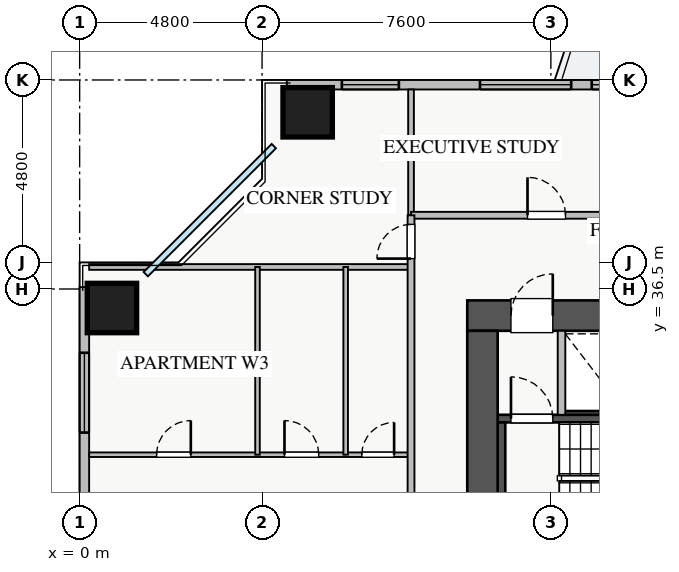
"""IFC4 building model, lengths in metres.
Left out: names, types, materials, properties, quantities, classifications, styles, units other than length and angle.
Written with IfcOpenShell. Run it as: python <this file> out.ifc"""

import sys

from ifc_helpers import new_model, si_unit, direction, frame, frame_2d, origin, origin_2d, place, context, subcontext, project, spatial, rectangle, extrude, source, transform, mapped, element, fill, save


model = new_model("IFC4")
c1 = context("Model", 3, precision=1e-05, world=origin(), true_north=direction((0.0, 1.0)))
c2 = subcontext(c1, "Body", "Model", "MODEL_VIEW")
j1 = project(units=[si_unit("LENGTHUNIT", "METRE"), si_unit("PLANEANGLEUNIT", "RADIAN")], contexts=[c1])
p1 = place(None, origin())
s1 = spatial("IfcSite", under=j1, at=p1, CompositionType="ELEMENT")
p2 = place(p1, origin())
s2 = spatial("IfcBuilding", under=s1, at=p2, CompositionType="ELEMENT")
p3 = place(p2, frame((0.0, 0.0, 89.25)))
s3 = spatial("IfcBuildingStorey", under=s2, at=p3, CompositionType="ELEMENT", Elevation=89.25)
p4 = place(p3, frame((12.68, 33.2, 0.0), z_axis=(0.0, 0.0, 1.0), x_axis=(1.0, 0.0, 0.0)))
e1 = element("IfcWall", 1, at=p4, inside=s3, PredefinedType="SHEAR", context=c2, shape_type="SweptSolid", body=[
    extrude(rectangle(XDim=1.94, YDim=0.18, at=frame_2d((0.97, 0.0))), origin(), (0.0, 0.0, 1.0), 3.03),
])
p5 = place(p3, frame((11.0, 33.09, 0.0), z_axis=(0.0, 0.0, 1.0), x_axis=(1.0, 0.0, 0.0)))
e2 = element("IfcWall", 2, at=p5, inside=s3, PredefinedType="SHEAR", context=c2, shape_type="SweptSolid", body=[
    extrude(rectangle(XDim=7.15, YDim=0.2, at=frame_2d((3.575, 0.0))), origin(), (0.0, 0.0, 1.0), 3.25),
])
p6 = place(p5, frame((0.35, 0.0, 0.0)))
e3 = element("IfcOpeningElement", 3, at=p6, cuts=e2, PredefinedType="OPENING", context=c2, shape_type="SweptSolid", body=[
    extrude(rectangle(XDim=1.1, YDim=2.05, at=frame_2d((0.55, 1.025))), frame((0.0, 0.11, 0.0), z_axis=(0.0, -1.0, 0.0), x_axis=(1.0, 0.0, 0.0)), (0.0, 0.0, 1.0), 0.22),
])
p7 = place(p3, frame((11.1, 30.05, 0.0), z_axis=(0.0, 0.0, 1.0), x_axis=(0.0, 1.0, 0.0)))
e4 = element("IfcWall", 4, at=p7, inside=s3, PredefinedType="SHEAR", context=c2, shape_type="SweptSolid", body=[
    extrude(rectangle(XDim=2.94, YDim=0.2, at=frame_2d((1.47, 0.0))), origin(), (0.0, 0.0, 1.0), 3.25),
])
p8 = place(p3, frame((10.2, 35.8, 0.0), z_axis=(0.0, 0.0, 1.0), x_axis=(1.0, 0.0, 0.0)))
e5 = element("IfcWall", 5, at=p8, inside=s3, PredefinedType="SHEAR", context=c2, shape_type="SweptSolid", body=[
    extrude(rectangle(XDim=17.6, YDim=0.8, at=frame_2d((8.8, 0.0))), origin(), (0.0, 0.0, 1.0), 3.25),
])
p9 = place(p8, frame((1.15, 0.0, 0.0)))
e6 = element("IfcOpeningElement", 6, at=p9, cuts=e5, PredefinedType="OPENING", context=c2, shape_type="SweptSolid", body=[
    extrude(rectangle(XDim=1.1, YDim=2.05, at=frame_2d((0.55, 1.025))), frame((0.0, 0.41, 0.0), z_axis=(0.0, -1.0, 0.0), x_axis=(1.0, 0.0, 0.0)), (0.0, 0.0, 1.0), 0.82),
])
p10 = place(p8, frame((8.3, 0.0, 0.0)))
e7 = element("IfcOpeningElement", 7, at=p10, cuts=e5, PredefinedType="OPENING", context=c2, shape_type="SweptSolid", body=[
    extrude(rectangle(XDim=1.1, YDim=2.05, at=frame_2d((0.55, 1.025))), frame((0.0, 0.41, 0.0), z_axis=(0.0, -1.0, 0.0), x_axis=(1.0, 0.0, 0.0)), (0.0, 0.0, 1.0), 0.82),
])
p11 = place(p8, frame((10.05, 0.0, 0.0)))
e8 = element("IfcOpeningElement", 8, at=p11, cuts=e5, PredefinedType="OPENING", context=c2, shape_type="SweptSolid", body=[
    extrude(rectangle(XDim=1.1, YDim=2.05, at=frame_2d((0.55, 1.025))), frame((0.0, 0.41, 0.0), z_axis=(0.0, -1.0, 0.0), x_axis=(1.0, 0.0, 0.0)), (0.0, 0.0, 1.0), 0.82),
])
p12 = place(p8, frame((14.74, 0.0, 0.0)))
e9 = element("IfcOpeningElement", 9, at=p12, cuts=e5, PredefinedType="OPENING", context=c2, shape_type="SweptSolid", body=[
    extrude(rectangle(XDim=1.0, YDim=2.05, at=frame_2d((0.5, 1.025))), frame((0.0, 0.41, 0.0), z_axis=(0.0, -1.0, 0.0), x_axis=(1.0, 0.0, 0.0)), (0.0, 0.0, 1.0), 0.82),
])
p13 = place(p8, frame((11.835, 0.0, 0.0)))
e10 = element("IfcOpeningElement", 10, at=p13, cuts=e5, PredefinedType="OPENING", context=c2, shape_type="SweptSolid", body=[
    extrude(rectangle(XDim=1.0, YDim=2.05, at=frame_2d((0.5, 1.025))), frame((0.0, 0.41, 0.0), z_axis=(0.0, -1.0, 0.0), x_axis=(1.0, 0.0, 0.0)), (0.0, 0.0, 1.0), 0.82),
])
p14 = place(p8, frame((13.37, 0.0, 0.0)))
e11 = element("IfcOpeningElement", 11, at=p14, cuts=e5, PredefinedType="OPENING", context=c2, shape_type="SweptSolid", body=[
    extrude(rectangle(XDim=1.0, YDim=2.05, at=frame_2d((0.5, 1.025))), frame((0.0, 0.41, 0.0), z_axis=(0.0, -1.0, 0.0), x_axis=(1.0, 0.0, 0.0)), (0.0, 0.0, 1.0), 0.82),
])
p15 = place(p3, frame((10.6, 29.8, 0.0), z_axis=(0.0, 0.0, 1.0), x_axis=(0.0, 1.0, 0.0)))
e12 = element("IfcWall", 12, at=p15, inside=s3, PredefinedType="SHEAR", context=c2, shape_type="SweptSolid", body=[
    extrude(rectangle(XDim=5.6, YDim=0.8, at=frame_2d((2.8, 0.0))), origin(), (0.0, 0.0, 1.0), 3.25),
])
m1 = source(origin(), c2, "Body", "SweptSolid", [
    extrude(rectangle(XDim=1.3, YDim=1.3, at=origin_2d()), origin(), (0.0, 0.0, 1.0), 3.25),
])
for number, where, z_axis, x_axis in (
    (13, (6.0, 41.15, 0.0), (0.0, 0.0, 1.0), (1.0, 0.0, 0.0)),
    (14, (0.85, 36.0, 0.0), (0.0, 0.0, 1.0), (1.0, 0.0, 0.0)),
):
    element("IfcColumn", number, at=place(p3, frame(where, z_axis=z_axis, x_axis=x_axis)), inside=s3, PredefinedType="COLUMN", context=c2, shape_type="MappedRepresentation", body=[
        mapped(m1, transform((0.0, 0.0, 0.0), x_axis=(1.0, 0.0, 0.0), y_axis=(0.0, 1.0, 0.0), z_axis=(0.0, 0.0, 1.0), scale=1.0)),
    ])
p16 = place(p3, frame((5.45, 41.875, 0.0), z_axis=(0.0, 0.0, 1.0), x_axis=(1.0, 0.0, 0.0)))
e15 = element("IfcWall", 15, at=p16, inside=s3, PredefinedType="STANDARD", context=c2, shape_type="SweptSolid", body=[
    extrude(rectangle(XDim=27.1, YDim=0.25, at=frame_2d((13.55, 0.0))), origin(), (0.0, 0.0, 1.0), 2.57),
])
p17 = place(p16, frame((14.4, 0.0, 0.0)))
e16 = element("IfcOpeningElement", 16, at=p17, cuts=e15, PredefinedType="OPENING", context=c2, shape_type="SweptSolid", body=[
    extrude(rectangle(XDim=1.2, YDim=2.1, at=frame_2d((0.6, 1.05))), frame((0.0, 0.135, 0.0), z_axis=(0.0, -1.0, 0.0), x_axis=(1.0, 0.0, 0.0)), (0.0, 0.0, 1.0), 0.27),
])
p18 = place(p16, frame((1.45, 0.0, 0.9)))
e17 = element("IfcOpeningElement", 17, at=p18, cuts=e15, PredefinedType="OPENING", context=c2, shape_type="SweptSolid", body=[
    extrude(rectangle(XDim=1.5, YDim=1.5, at=frame_2d((0.75, 0.75))), frame((0.0, 0.135, 0.0), z_axis=(0.0, -1.0, 0.0), x_axis=(1.0, 0.0, 0.0)), (0.0, 0.0, 1.0), 0.27),
])
p19 = place(p16, frame((8.024, 0.0, 0.9)))
e18 = element("IfcOpeningElement", 18, at=p19, cuts=e15, PredefinedType="OPENING", context=c2, shape_type="SweptSolid", body=[
    extrude(rectangle(XDim=1.8, YDim=1.5, at=frame_2d((0.9, 0.75))), frame((0.0, 0.135, 0.0), z_axis=(0.0, -1.0, 0.0), x_axis=(1.0, 0.0, 0.0)), (0.0, 0.0, 1.0), 0.27),
])
p20 = place(p16, frame((16.188, 0.0, 0.9)))
e19 = element("IfcOpeningElement", 19, at=p20, cuts=e15, PredefinedType="OPENING", context=c2, shape_type="SweptSolid", body=[
    extrude(rectangle(XDim=1.5, YDim=1.45, at=frame_2d((0.75, 0.725))), frame((0.0, 0.135, 0.0), z_axis=(0.0, -1.0, 0.0), x_axis=(1.0, 0.0, 0.0)), (0.0, 0.0, 1.0), 0.27),
])
p21 = place(p16, frame((22.663, 0.0, 0.9)))
e20 = element("IfcOpeningElement", 20, at=p21, cuts=e15, PredefinedType="OPENING", context=c2, shape_type="SweptSolid", body=[
    extrude(rectangle(XDim=2.1, YDim=1.48, at=frame_2d((1.05, 0.74))), frame((0.0, 0.135, 0.0), z_axis=(0.0, -1.0, 0.0), x_axis=(1.0, 0.0, 0.0)), (0.0, 0.0, 1.0), 0.27),
])
p22 = place(p16, frame((5.084, 0.0, 0.9)))
e21 = element("IfcOpeningElement", 21, at=p22, cuts=e15, PredefinedType="OPENING", context=c2, shape_type="SweptSolid", body=[
    extrude(rectangle(XDim=2.4, YDim=1.5, at=frame_2d((1.2, 0.75))), frame((0.0, 0.135, 0.0), z_axis=(0.0, -1.0, 0.0), x_axis=(1.0, 0.0, 0.0)), (0.0, 0.0, 1.0), 0.27),
])
p23 = place(p16, frame((11.208, 0.0, 0.9)))
e22 = element("IfcOpeningElement", 22, at=p23, cuts=e15, PredefinedType="OPENING", context=c2, shape_type="SweptSolid", body=[
    extrude(rectangle(XDim=2.4, YDim=1.5, at=frame_2d((1.2, 0.75))), frame((0.0, 0.135, 0.0), z_axis=(0.0, -1.0, 0.0), x_axis=(1.0, 0.0, 0.0)), (0.0, 0.0, 1.0), 0.27),
])
p24 = place(p3, frame((0.125, 9.45, 0.0), z_axis=(0.0, 0.0, 1.0), x_axis=(0.0, 1.0, 0.0)))
e23 = element("IfcWall", 23, at=p24, inside=s3, PredefinedType="STANDARD", context=c2, shape_type="SweptSolid", body=[
    extrude(rectangle(XDim=27.1, YDim=0.25, at=frame_2d((13.55, 0.0))), origin(), (0.0, 0.0, 1.0), 2.57),
])
p25 = place(p24, frame((14.4, 0.0, 0.0)))
e24 = element("IfcOpeningElement", 24, at=p25, cuts=e23, PredefinedType="OPENING", context=c2, shape_type="SweptSolid", body=[
    extrude(rectangle(XDim=1.2, YDim=2.1, at=frame_2d((0.6, 1.05))), frame((0.0, 0.135, 0.0), z_axis=(0.0, -1.0, 0.0), x_axis=(1.0, 0.0, 0.0)), (0.0, 0.0, 1.0), 0.27),
])
p26 = place(p24, frame((1.482, 0.0, 0.9)))
e25 = element("IfcOpeningElement", 25, at=p26, cuts=e23, PredefinedType="OPENING", context=c2, shape_type="SweptSolid", body=[
    extrude(rectangle(XDim=2.1, YDim=1.5, at=frame_2d((1.05, 0.75))), frame((0.0, 0.135, 0.0), z_axis=(0.0, -1.0, 0.0), x_axis=(1.0, 0.0, 0.0)), (0.0, 0.0, 1.0), 0.27),
])
p27 = place(p24, frame((23.272, 0.0, 0.9)))
e26 = element("IfcOpeningElement", 26, at=p27, cuts=e23, PredefinedType="OPENING", context=c2, shape_type="SweptSolid", body=[
    extrude(rectangle(XDim=2.1, YDim=1.5, at=frame_2d((1.05, 0.75))), frame((0.0, 0.135, 0.0), z_axis=(0.0, -1.0, 0.0), x_axis=(1.0, 0.0, 0.0)), (0.0, 0.0, 1.0), 0.27),
])
p28 = place(p24, frame((5.317, 0.0, 0.9)))
e27 = element("IfcOpeningElement", 27, at=p28, cuts=e23, PredefinedType="OPENING", context=c2, shape_type="SweptSolid", body=[
    extrude(rectangle(XDim=2.4, YDim=1.5, at=frame_2d((1.2, 0.75))), frame((0.0, 0.135, 0.0), z_axis=(0.0, -1.0, 0.0), x_axis=(1.0, 0.0, 0.0)), (0.0, 0.0, 1.0), 0.27),
])
p29 = place(p24, frame((11.365, 0.0, 0.9)))
e28 = element("IfcOpeningElement", 28, at=p29, cuts=e23, PredefinedType="OPENING", context=c2, shape_type="SweptSolid", body=[
    extrude(rectangle(XDim=0.9, YDim=1.2, at=frame_2d((0.45, 0.6))), frame((0.0, 0.135, 0.0), z_axis=(0.0, -1.0, 0.0), x_axis=(1.0, 0.0, 0.0)), (0.0, 0.0, 1.0), 0.27),
])
p30 = place(p24, frame((18.365, 0.0, 0.9)))
e29 = element("IfcOpeningElement", 29, at=p30, cuts=e23, PredefinedType="OPENING", context=c2, shape_type="SweptSolid", body=[
    extrude(rectangle(XDim=0.9, YDim=1.2, at=frame_2d((0.45, 0.6))), frame((0.0, 0.135, 0.0), z_axis=(0.0, -1.0, 0.0), x_axis=(1.0, 0.0, 0.0)), (0.0, 0.0, 1.0), 0.27),
])
p31 = place(p3, frame((12.68, 33.19, 0.0), z_axis=(0.0, 0.0, 1.0), x_axis=(0.0, 1.0, 0.0)))
e30 = element("IfcWall", 30, at=p31, inside=s3, PredefinedType="PARTITIONING", context=c2, shape_type="SweptSolid", body=[
    extrude(rectangle(XDim=2.21, YDim=0.2, at=frame_2d((1.105, 0.0))), origin(), (0.0, 0.0, 1.0), 3.03),
])
p32 = place(p3, frame((8.72, 38.44, 0.0), z_axis=(0.0, 0.0, 1.0), x_axis=(0.0, 1.0, 0.0)))
e31 = element("IfcWall", 31, at=p32, inside=s3, PredefinedType="PARTITIONING", context=c2, shape_type="SweptSolid", body=[
    extrude(rectangle(XDim=3.31, YDim=0.15, at=frame_2d((1.655, 0.0))), origin(), (0.0, 0.0, 1.0), 3.03),
])
p33 = place(p3, frame((8.72, 38.44, 0.0), z_axis=(0.0, 0.0, 1.0), x_axis=(1.0, 0.0, 0.0)))
e32 = element("IfcWall", 32, at=p33, inside=s3, PredefinedType="PARTITIONING", context=c2, shape_type="SweptSolid", body=[
    extrude(rectangle(XDim=23.63, YDim=0.18, at=frame_2d((11.815, 0.0))), origin(), (0.0, 0.0, 1.0), 3.03),
])
p34 = place(p33, frame((3.065, 0.0, 0.0)))
e33 = element("IfcOpeningElement", 33, at=p34, cuts=e32, PredefinedType="OPENING", context=c2, shape_type="SweptSolid", body=[
    extrude(rectangle(XDim=1.0, YDim=2.05, at=frame_2d((0.5, 1.025))), frame((0.0, 0.1, 0.0), z_axis=(0.0, -1.0, 0.0), x_axis=(1.0, 0.0, 0.0)), (0.0, 0.0, 1.0), 0.2),
])
p35 = place(p33, frame((10.94, 0.0, 0.0)))
e34 = element("IfcOpeningElement", 34, at=p35, cuts=e32, PredefinedType="OPENING", context=c2, shape_type="SweptSolid", body=[
    extrude(rectangle(XDim=1.0, YDim=2.05, at=frame_2d((0.5, 1.025))), frame((0.0, 0.1, 0.0), z_axis=(0.0, -1.0, 0.0), x_axis=(1.0, 0.0, 0.0)), (0.0, 0.0, 1.0), 0.2),
])
p36 = place(p33, frame((19.19, 0.0, 0.0)))
e35 = element("IfcOpeningElement", 35, at=p36, cuts=e32, PredefinedType="OPENING", context=c2, shape_type="SweptSolid", body=[
    extrude(rectangle(XDim=1.0, YDim=2.05, at=frame_2d((0.5, 1.025))), frame((0.0, 0.1, 0.0), z_axis=(0.0, -1.0, 0.0), x_axis=(1.0, 0.0, 0.0)), (0.0, 0.0, 1.0), 0.2),
])
p37 = place(p3, frame((0.25, 37.08, 0.0), z_axis=(0.0, 0.0, 1.0), x_axis=(1.0, 0.0, 0.0)))
e36 = element("IfcWall", 36, at=p37, inside=s3, PredefinedType="PARTITIONING", context=c2, shape_type="SweptSolid", body=[
    extrude(rectangle(XDim=8.47, YDim=0.15, at=frame_2d((4.235, 0.0))), origin(), (0.0, 0.0, 1.0), 3.03),
])
p38 = place(p3, frame((0.25, 32.14, 0.0), z_axis=(0.0, 0.0, 1.0), x_axis=(1.0, 0.0, 0.0)))
e37 = element("IfcWall", 37, at=p38, inside=s3, PredefinedType="PLUMBINGWALL", context=c2, shape_type="SweptSolid", body=[
    extrude(rectangle(XDim=8.47, YDim=0.12, at=frame_2d((4.235, 0.0))), origin(), (0.0, 0.0, 1.0), 3.03),
])
p39 = place(p38, frame((1.775, 0.0, 0.0)))
e38 = element("IfcOpeningElement", 38, at=p39, cuts=e37, PredefinedType="OPENING", context=c2, shape_type="SweptSolid", body=[
    extrude(rectangle(XDim=0.9, YDim=2.05, at=frame_2d((0.45, 1.025))), frame((0.0, 0.07, 0.0), z_axis=(0.0, -1.0, 0.0), x_axis=(1.0, 0.0, 0.0)), (0.0, 0.0, 1.0), 0.14),
])
p40 = place(p38, frame((5.14, 0.0, 0.0)))
e39 = element("IfcOpeningElement", 39, at=p40, cuts=e37, PredefinedType="OPENING", context=c2, shape_type="SweptSolid", body=[
    extrude(rectangle(XDim=0.9, YDim=2.05, at=frame_2d((0.45, 1.025))), frame((0.0, 0.07, 0.0), z_axis=(0.0, -1.0, 0.0), x_axis=(1.0, 0.0, 0.0)), (0.0, 0.0, 1.0), 0.14),
])
p41 = place(p38, frame((7.175, 0.0, 0.0)))
e40 = element("IfcOpeningElement", 40, at=p41, cuts=e37, PredefinedType="OPENING", context=c2, shape_type="SweptSolid", body=[
    extrude(rectangle(XDim=0.85, YDim=2.05, at=frame_2d((0.425, 1.025))), frame((0.0, 0.07, 0.0), z_axis=(0.0, -1.0, 0.0), x_axis=(1.0, 0.0, 0.0)), (0.0, 0.0, 1.0), 0.14),
])
for number, where, z_axis, x_axis in (
    (41, (4.68, 32.14, 0.0), (0.0, 0.0, 1.0), (0.0, 1.0, 0.0)),
    (42, (7.0, 32.14, 0.0), (0.0, 0.0, 1.0), (0.0, 1.0, 0.0)),
):
    element("IfcWall", number, at=place(p3, frame(where, z_axis=z_axis, x_axis=x_axis)), inside=s3, PredefinedType="PLUMBINGWALL", context=c2, shape_type="SweptSolid", body=[
        extrude(rectangle(XDim=4.94, YDim=0.12, at=frame_2d((2.47, 0.0))), origin(), (0.0, 0.0, 1.0), 3.03),
    ])
p42 = place(p3, frame((8.72, 7.21, 0.0), z_axis=(0.0, 0.0, 1.0), x_axis=(0.0, 1.0, 0.0)))
e43 = element("IfcWall", 43, at=p42, inside=s3, PredefinedType="PARTITIONING", context=c2, shape_type="SweptSolid", body=[
    extrude(rectangle(XDim=31.23, YDim=0.18, at=frame_2d((15.615, 0.0))), origin(), (0.0, 0.0, 1.0), 3.03),
])
p43 = place(p42, frame((30.09, 0.0, 0.0)))
e44 = element("IfcOpeningElement", 44, at=p43, cuts=e43, PredefinedType="OPENING", context=c2, shape_type="SweptSolid", body=[
    extrude(rectangle(XDim=0.9, YDim=2.05, at=frame_2d((0.45, 1.025))), frame((0.0, 0.1, 0.0), z_axis=(0.0, -1.0, 0.0), x_axis=(1.0, 0.0, 0.0)), (0.0, 0.0, 1.0), 0.2),
])
p44 = place(p42, frame((0.24, 0.0, 0.0)))
e45 = element("IfcOpeningElement", 45, at=p44, cuts=e43, PredefinedType="OPENING", context=c2, shape_type="SweptSolid", body=[
    extrude(rectangle(XDim=0.9, YDim=2.05, at=frame_2d((0.45, 1.025))), frame((0.0, 0.1, 0.0), z_axis=(0.0, -1.0, 0.0), x_axis=(1.0, 0.0, 0.0)), (0.0, 0.0, 1.0), 0.2),
])
p45 = place(p42, frame((3.07, 0.0, 0.0)))
e46 = element("IfcOpeningElement", 46, at=p45, cuts=e43, PredefinedType="OPENING", context=c2, shape_type="SweptSolid", body=[
    extrude(rectangle(XDim=1.0, YDim=2.05, at=frame_2d((0.5, 1.025))), frame((0.0, 0.1, 0.0), z_axis=(0.0, -1.0, 0.0), x_axis=(1.0, 0.0, 0.0)), (0.0, 0.0, 1.0), 0.2),
])
p46 = place(p42, frame((15.37, 0.0, 0.0)))
e47 = element("IfcOpeningElement", 47, at=p46, cuts=e43, PredefinedType="OPENING", context=c2, shape_type="SweptSolid", body=[
    extrude(rectangle(XDim=1.0, YDim=2.05, at=frame_2d((0.5, 1.025))), frame((0.0, 0.1, 0.0), z_axis=(0.0, -1.0, 0.0), x_axis=(1.0, 0.0, 0.0)), (0.0, 0.0, 1.0), 0.2),
])
p47 = place(p42, frame((21.96, 0.0, 0.0)))
e48 = element("IfcOpeningElement", 48, at=p47, cuts=e43, PredefinedType="OPENING", context=c2, shape_type="SweptSolid", body=[
    extrude(rectangle(XDim=1.0, YDim=2.05, at=frame_2d((0.5, 1.025))), frame((0.0, 0.1, 0.0), z_axis=(0.0, -1.0, 0.0), x_axis=(1.0, 0.0, 0.0)), (0.0, 0.0, 1.0), 0.2),
])
m2 = source(origin(), c2, "Body", "SweptSolid", [
    extrude(rectangle(XDim=1.5, YDim=1.5, at=frame_2d((0.75, 0.75))), frame((0.0, 0.03, 0.0), z_axis=(0.0, -1.0, 0.0), x_axis=(1.0, 0.0, 0.0)), (0.0, 0.0, 1.0), 0.06),
])
p48 = place(p18, origin())
e49 = element("IfcWindow", 49, at=p48, inside=s3, PartitioningType="TRIPLE_PANEL_VERTICAL", PredefinedType="WINDOW", context=c2, shape_type="MappedRepresentation", body=[
    mapped(m2, transform((0.0, 0.0, 0.0), x_axis=(1.0, 0.0, 0.0), y_axis=(0.0, 1.0, 0.0), z_axis=(0.0, 0.0, 1.0), scale=1.0)),
])
fill(e17, e49)
m3 = source(origin(), c2, "Body", "SweptSolid", [
    extrude(rectangle(XDim=1.8, YDim=1.5, at=frame_2d((0.9, 0.75))), frame((0.0, 0.03, 0.0), z_axis=(0.0, -1.0, 0.0), x_axis=(1.0, 0.0, 0.0)), (0.0, 0.0, 1.0), 0.06),
])
p49 = place(p19, origin())
e50 = element("IfcWindow", 50, at=p49, inside=s3, PartitioningType="DOUBLE_PANEL_VERTICAL", PredefinedType="WINDOW", context=c2, shape_type="MappedRepresentation", body=[
    mapped(m3, transform((0.0, 0.0, 0.0), x_axis=(1.0, 0.0, 0.0), y_axis=(0.0, 1.0, 0.0), z_axis=(0.0, 0.0, 1.0), scale=1.0)),
])
fill(e18, e50)
m4 = source(origin(), c2, "Body", "SweptSolid", [
    extrude(rectangle(XDim=2.1, YDim=1.5, at=frame_2d((1.05, 0.75))), frame((0.0, 0.03, 0.0), z_axis=(0.0, -1.0, 0.0), x_axis=(1.0, 0.0, 0.0)), (0.0, 0.0, 1.0), 0.06),
])
p50 = place(p27, origin())
e51 = element("IfcWindow", 51, at=p50, inside=s3, PartitioningType="TRIPLE_PANEL_VERTICAL", PredefinedType="WINDOW", context=c2, shape_type="MappedRepresentation", body=[
    mapped(m4, transform((0.0, 0.0, 0.0), x_axis=(1.0, 0.0, 0.0), y_axis=(0.0, 1.0, 0.0), z_axis=(0.0, 0.0, 1.0), scale=1.0)),
])
fill(e26, e51)
m5 = source(origin(), c2, "Body", "SweptSolid", [
    extrude(rectangle(XDim=1.1, YDim=2.05, at=frame_2d((0.55, 1.025))), frame((0.0, 0.025, 0.0), z_axis=(0.0, -1.0, 0.0), x_axis=(1.0, 0.0, 0.0)), (0.0, 0.0, 1.0), 0.05),
])
p51 = place(p9, origin())
e52 = element("IfcDoor", 52, at=p51, inside=s3, OperationType="SINGLE_SWING_RIGHT", PredefinedType="DOOR", context=c2, shape_type="MappedRepresentation", body=[
    mapped(m5, transform((0.0, 0.0, 0.0), x_axis=(1.0, 0.0, 0.0), y_axis=(0.0, 1.0, 0.0), z_axis=(0.0, 0.0, 1.0), scale=1.0)),
])
fill(e6, e52)
p52 = place(p6, origin())
e53 = element("IfcDoor", 53, at=p52, inside=s3, OperationType="SINGLE_SWING_LEFT", PredefinedType="DOOR", context=c2, shape_type="MappedRepresentation", body=[
    mapped(m5, transform((0.0, 0.0, 0.0), x_axis=(1.0, 0.0, 0.0), y_axis=(0.0, 1.0, 0.0), z_axis=(0.0, 0.0, 1.0), scale=1.0)),
])
fill(e3, e53)
m6 = source(origin(), c2, "Body", "SweptSolid", [
    extrude(rectangle(XDim=1.0, YDim=2.05, at=frame_2d((0.5, 1.025))), frame((0.0, 0.025, 0.0), z_axis=(0.0, -1.0, 0.0), x_axis=(1.0, 0.0, 0.0)), (0.0, 0.0, 1.0), 0.05),
])
p53 = place(p34, origin())
e54 = element("IfcDoor", 54, at=p53, inside=s3, OperationType="SINGLE_SWING_LEFT", PredefinedType="DOOR", context=c2, shape_type="MappedRepresentation", body=[
    mapped(m6, transform((0.0, 0.0, 0.0), x_axis=(1.0, 0.0, 0.0), y_axis=(0.0, 1.0, 0.0), z_axis=(0.0, 0.0, 1.0), scale=1.0)),
])
fill(e33, e54)
m7 = source(origin(), c2, "Body", "SweptSolid", [
    extrude(rectangle(XDim=0.9, YDim=2.05, at=frame_2d((0.45, 1.025))), frame((0.0, 0.025, 0.0), z_axis=(0.0, -1.0, 0.0), x_axis=(1.0, 0.0, 0.0)), (0.0, 0.0, 1.0), 0.05),
])
p54 = place(p39, origin())
e55 = element("IfcDoor", 55, at=p54, inside=s3, OperationType="SINGLE_SWING_RIGHT", PredefinedType="DOOR", context=c2, shape_type="MappedRepresentation", body=[
    mapped(m7, transform((0.0, 0.0, 0.0), x_axis=(1.0, 0.0, 0.0), y_axis=(0.0, 1.0, 0.0), z_axis=(0.0, 0.0, 1.0), scale=1.0)),
])
fill(e38, e55)
p55 = place(p40, origin())
e56 = element("IfcDoor", 56, at=p55, inside=s3, OperationType="SINGLE_SWING_LEFT", PredefinedType="DOOR", context=c2, shape_type="MappedRepresentation", body=[
    mapped(m7, transform((0.0, 0.0, 0.0), x_axis=(1.0, 0.0, 0.0), y_axis=(0.0, 1.0, 0.0), z_axis=(0.0, 0.0, 1.0), scale=1.0)),
])
fill(e39, e56)
m8 = source(origin(), c2, "Body", "SweptSolid", [
    extrude(rectangle(XDim=0.85, YDim=2.05, at=frame_2d((0.425, 1.025))), frame((0.0, 0.025, 0.0), z_axis=(0.0, -1.0, 0.0), x_axis=(1.0, 0.0, 0.0)), (0.0, 0.0, 1.0), 0.05),
])
p56 = place(p41, origin())
e57 = element("IfcDoor", 57, at=p56, inside=s3, OperationType="SINGLE_SWING_RIGHT", PredefinedType="DOOR", context=c2, shape_type="MappedRepresentation", body=[
    mapped(m8, transform((0.0, 0.0, 0.0), x_axis=(1.0, 0.0, 0.0), y_axis=(0.0, 1.0, 0.0), z_axis=(0.0, 0.0, 1.0), scale=1.0)),
])
fill(e40, e57)
p57 = place(p43, origin())
e58 = element("IfcDoor", 58, at=p57, inside=s3, OperationType="SINGLE_SWING_LEFT", PredefinedType="DOOR", context=c2, shape_type="MappedRepresentation", body=[
    mapped(m7, transform((0.0, 0.0, 0.0), x_axis=(1.0, 0.0, 0.0), y_axis=(0.0, 1.0, 0.0), z_axis=(0.0, 0.0, 1.0), scale=1.0)),
])
fill(e44, e58)
m9 = source(origin(), c2, "Body", "SweptSolid", [
    extrude(rectangle(XDim=2.4, YDim=1.5, at=frame_2d((1.2, 0.75))), frame((0.0, 0.03, 0.0), z_axis=(0.0, -1.0, 0.0), x_axis=(1.0, 0.0, 0.0)), (0.0, 0.0, 1.0), 0.06),
])
p58 = place(p22, origin())
e59 = element("IfcWindow", 59, at=p58, inside=s3, PartitioningType="TRIPLE_PANEL_VERTICAL", PredefinedType="WINDOW", context=c2, shape_type="MappedRepresentation", body=[
    mapped(m9, transform((0.0, 0.0, 0.0), x_axis=(1.0, 0.0, 0.0), y_axis=(0.0, 1.0, 0.0), z_axis=(0.0, 0.0, 1.0), scale=1.0)),
])
fill(e21, e59)
save(model, sys.argv[1])
